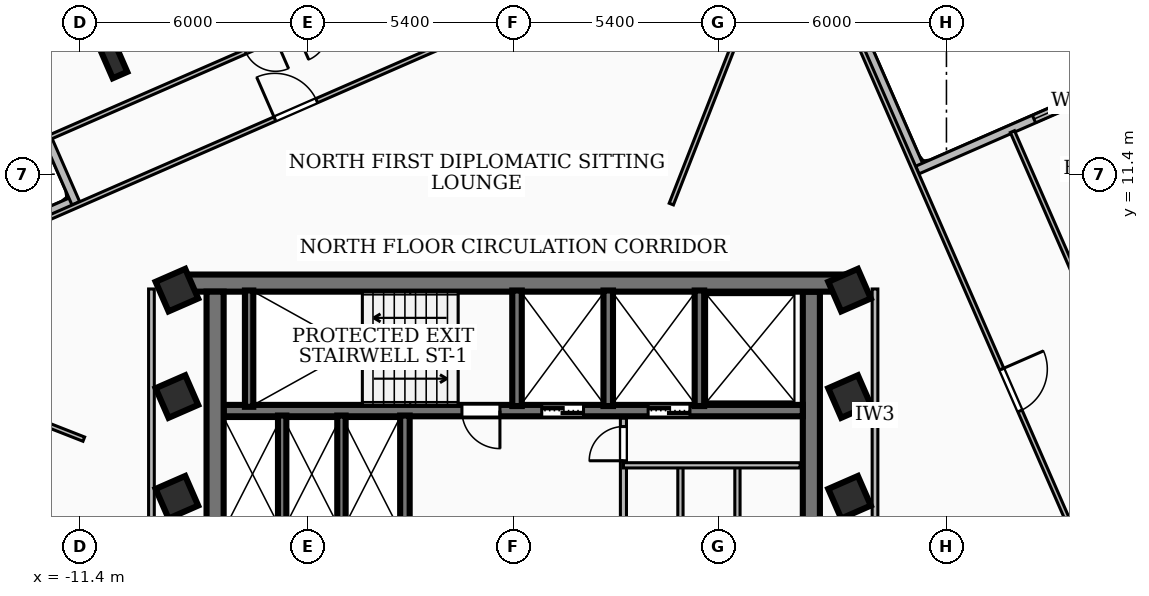
"""IFC4 building model, lengths in metres.
Left out: names, types, materials, properties, quantities, classifications, styles, units other than length and angle.
Written with IfcOpenShell. Run it as: python <this file> out.ifc"""

import sys

from ifc_helpers import new_model, si_unit, direction, frame, frame_2d, origin, origin_2d, place, context, subcontext, project, spatial, rectangle, i_section, extrude, element, fill, save


model = new_model("IFC4")
c1 = context("Model", 3, precision=1e-05, world=origin(), true_north=direction((0.0, 1.0)))
c2 = subcontext(c1, "Body", "Model", "MODEL_VIEW")
j1 = project(units=[si_unit("LENGTHUNIT", "METRE"), si_unit("PLANEANGLEUNIT", "RADIAN")], contexts=[c1])
p1 = place(None, origin())
s1 = spatial("IfcSite", under=j1, at=p1, CompositionType="ELEMENT")
p2 = place(p1, origin())
s2 = spatial("IfcBuilding", under=s1, at=p2, CompositionType="ELEMENT")
p3 = place(p2, frame((0.0, 0.0, 181.08)))
s3 = spatial("IfcBuildingStorey", under=s2, at=p3, CompositionType="ELEMENT", Elevation=181.08)
p4 = place(p3, frame((-8.78, 8.535, 0.0), z_axis=(0.0, 0.0, 1.0), x_axis=(1.0, 0.0, 0.0)))
e1 = element("IfcWall", 1, at=p4, inside=s3, PredefinedType="SHEAR", context=c2, shape_type="SweptSolid", body=[
    extrude(rectangle(XDim=17.56, YDim=0.45, at=frame_2d((8.78, 0.0))), origin(), (0.0, 0.0, 1.0), 3.34),
])
for number, where, z_axis, x_axis in (
    (2, (-7.845, 1.975, 0.0), (0.0, 0.0, 1.0), (0.0, 1.0, 0.0)),
    (3, (7.845, 8.31, 0.0), (0.0, 0.0, 1.0), (0.0, -1.0, 0.0)),
):
    element("IfcWall", number, at=place(p3, frame(where, z_axis=z_axis, x_axis=x_axis)), inside=s3, PredefinedType="SHEAR", context=c2, shape_type="SweptSolid", body=[
        extrude(rectangle(XDim=6.335, YDim=0.45, at=frame_2d((3.167, 0.0))), origin(), (0.0, 0.0, 1.0), 3.34),
    ])
p5 = place(p3, frame((7.62, 5.18, 0.0), z_axis=(0.0, 0.0, 1.0), x_axis=(-1.0, 0.0, 0.0)))
e4 = element("IfcWall", 4, at=p5, inside=s3, PredefinedType="SOLIDWALL", context=c2, shape_type="SweptSolid", body=[
    extrude(rectangle(XDim=15.24, YDim=0.3, at=frame_2d((7.62, 0.0))), origin(), (0.0, 0.0, 1.0), 3.34),
])
p6 = place(p5, frame((5.77, 0.0, 0.0)))
e5 = element("IfcOpeningElement", 5, at=p6, cuts=e4, PredefinedType="OPENING", context=c2, shape_type="SweptSolid", body=[
    extrude(rectangle(XDim=1.1, YDim=2.15, at=frame_2d((0.55, 1.075))), frame((0.0, 0.16, 0.0), z_axis=(0.0, -1.0, 0.0), x_axis=(1.0, 0.0, 0.0)), (0.0, 0.0, 1.0), 0.32),
])
p7 = place(p5, frame((2.97, 0.0, 0.0)))
e6 = element("IfcOpeningElement", 6, at=p7, cuts=e4, PredefinedType="OPENING", context=c2, shape_type="SweptSolid", body=[
    extrude(rectangle(XDim=1.1, YDim=2.15, at=frame_2d((0.55, 1.075))), frame((0.0, 0.16, 0.0), z_axis=(0.0, -1.0, 0.0), x_axis=(1.0, 0.0, 0.0)), (0.0, 0.0, 1.0), 0.32),
])
p8 = place(p5, frame((7.97, 0.0, 0.0)))
e7 = element("IfcOpeningElement", 7, at=p8, cuts=e4, PredefinedType="OPENING", context=c2, shape_type="SweptSolid", body=[
    extrude(rectangle(XDim=1.0, YDim=2.1, at=frame_2d((0.5, 1.05))), frame((0.0, 0.16, 0.0), z_axis=(0.0, -1.0, 0.0), x_axis=(1.0, 0.0, 0.0)), (0.0, 0.0, 1.0), 0.32),
])
p9 = place(p3, frame((-6.95, 5.28, 0.0), z_axis=(0.0, 0.0, 1.0), x_axis=(0.0, 1.0, 0.0)))
e8 = element("IfcWall", 8, at=p9, inside=s3, PredefinedType="SOLIDWALL", context=c2, shape_type="SweptSolid", body=[
    extrude(rectangle(XDim=3.06, YDim=0.22, at=frame_2d((1.53, 0.0))), origin(), (0.0, 0.0, 1.0), 3.34),
])
for number, where, z_axis, x_axis in (
    (9, (0.1, 5.3, 0.0), (0.0, 0.0, 1.0), (0.0, 1.0, 0.0)),
    (10, (2.5, 5.3, 0.0), (0.0, 0.0, 1.0), (0.0, 1.0, 0.0)),
    (11, (4.9, 5.3, 0.0), (0.0, 0.0, 1.0), (0.0, 1.0, 0.0)),
):
    element("IfcWall", number, at=place(p3, frame(where, z_axis=z_axis, x_axis=x_axis)), inside=s3, PredefinedType="SOLIDWALL", context=c2, shape_type="SweptSolid", body=[
        extrude(rectangle(XDim=3.04, YDim=0.25, at=frame_2d((1.52, 0.0))), origin(), (0.0, 0.0, 1.0), 3.34),
    ])
p10 = place(p3, frame((-2.85, 1.98, 0.0), z_axis=(0.0, 0.0, 1.0), x_axis=(0.0, 1.0, 0.0)))
e12 = element("IfcWall", 12, at=p10, inside=s3, PredefinedType="SOLIDWALL", context=c2, shape_type="SweptSolid", body=[
    extrude(rectangle(XDim=3.07, YDim=0.25, at=frame_2d((1.535, 0.0))), origin(), (0.0, 0.0, 1.0), 3.34),
])
for number, where, z_axis, x_axis in (
    (13, (-6.08, 1.98, 0.0), (0.0, 0.0, 1.0), (0.0, 1.0, 0.0)),
    (14, (-4.52, 1.98, 0.0), (0.0, 0.0, 1.0), (0.0, 1.0, 0.0)),
):
    element("IfcWall", number, at=place(p3, frame(where, z_axis=z_axis, x_axis=x_axis)), inside=s3, PredefinedType="SOLIDWALL", context=c2, shape_type="SweptSolid", body=[
        extrude(rectangle(XDim=3.07, YDim=0.22, at=frame_2d((1.535, 0.0))), origin(), (0.0, 0.0, 1.0), 3.34),
    ])
for number, where, z_axis, x_axis in (
    (15, (-8.85, 2.9, 0.0), (0.0, 0.0, 1.0), (0.916, 0.4, 0.0)),
    (16, (-8.85, 5.55, 0.0), (0.0, 0.0, 1.0), (0.916, 0.4, 0.0)),
    (17, (8.85, 2.9, 0.0), (0.0, 0.0, 1.0), (0.916, 0.4, 0.0)),
    (18, (8.85, 5.55, 0.0), (0.0, 0.0, 1.0), (0.916, 0.4, 0.0)),
    (19, (-8.85, 8.35, 0.0), (0.0, 0.0, 1.0), (0.916, 0.4, 0.0)),
    (20, (8.85, 8.35, 0.0), (0.0, 0.0, 1.0), (0.916, 0.4, 0.0)),
):
    element("IfcColumn", number, at=place(p3, frame(where, z_axis=z_axis, x_axis=x_axis)), inside=s3, PredefinedType="COLUMN", context=c2, shape_type="SweptSolid", body=[
        extrude(rectangle(XDim=0.85, YDim=0.85, at=origin_2d()), origin(), (0.0, 0.0, 1.0), 3.6),
    ])
p11 = place(p3, frame((-10.533, 14.433, 0.0), z_axis=(0.0, 0.0, 1.0), x_axis=(0.916362729562, 0.400349032557, 0.0)))
e21 = element("IfcColumn", 21, at=p11, inside=s3, PredefinedType="COLUMN", context=c2, shape_type="SweptSolid", body=[
    extrude(i_section(OverallWidth=0.418, OverallDepth=0.927, WebThickness=0.019, FlangeThickness=0.032, at=origin_2d()), origin(), (0.0, 0.0, 1.0), 3.6),
])
p12 = place(p3, frame((-17.658, 8.044, 0.0), z_axis=(0.0, 0.0, 1.0), x_axis=(0.916361145567, 0.400352658158, 0.0)))
e22 = element("IfcWall", 22, at=p12, inside=s3, PredefinedType="SOLIDWALL", context=c2, shape_type="SweptSolid", body=[
    extrude(rectangle(XDim=6.759, YDim=0.22, at=frame_2d((3.38, 0.0))), origin(), (0.0, 0.0, 1.0), 3.34),
])
p13 = place(p3, frame((-11.51, 10.634, 0.0), z_axis=(0.0, 0.0, 1.0), x_axis=(-0.400350381948, 0.916362140027, 0.0)))
e23 = element("IfcWall", 23, at=p13, inside=s3, PredefinedType="SOLIDWALL", context=c2, shape_type="SweptSolid", body=[
    extrude(rectangle(XDim=8.258, YDim=0.22, at=frame_2d((4.129, 0.0))), origin(), (0.0, 0.0, 1.0), 3.34),
])
p14 = place(p13, frame((5.358, 0.0, 0.85)))
e24 = element("IfcOpeningElement", 24, at=p14, cuts=e23, PredefinedType="OPENING", context=c2, shape_type="SweptSolid", body=[
    extrude(rectangle(XDim=1.8, YDim=1.6, at=frame_2d((0.9, 0.8))), frame((0.0, 0.12, 0.0), z_axis=(0.0, -1.0, 0.0), x_axis=(1.0, 0.0, 0.0)), (0.0, 0.0, 1.0), 0.24),
])
p15 = place(p3, frame((8.044, 17.658, 0.0), z_axis=(0.0, 0.0, 1.0), x_axis=(0.400352658158, -0.916361145567, 0.0)))
e25 = element("IfcWall", 25, at=p15, inside=s3, PredefinedType="SOLIDWALL", context=c2, shape_type="SweptSolid", body=[
    extrude(rectangle(XDim=6.759, YDim=0.22, at=frame_2d((3.38, 0.0))), origin(), (0.0, 0.0, 1.0), 3.34),
])
p16 = place(p3, frame((10.634, 11.51, 0.0), z_axis=(0.0, 0.0, 1.0), x_axis=(0.916355581171, 0.400365394179, 0.0)))
e26 = element("IfcWall", 26, at=p16, inside=s3, PredefinedType="SOLIDWALL", context=c2, shape_type="SweptSolid", body=[
    extrude(rectangle(XDim=9.859, YDim=0.22, at=frame_2d((4.929, 0.0))), origin(), (0.0, 0.0, 1.0), 3.34),
])
p17 = place(p16, frame((3.35, 0.0, 0.85)))
e27 = element("IfcOpeningElement", 27, at=p17, cuts=e26, PredefinedType="OPENING", context=c2, shape_type="SweptSolid", body=[
    extrude(rectangle(XDim=2.4, YDim=2.1, at=frame_2d((1.2, 1.05))), frame((0.0, 0.12, 0.0), z_axis=(0.0, -1.0, 0.0), x_axis=(1.0, 0.0, 0.0)), (0.0, 0.0, 1.0), 0.24),
])
p18 = place(p3, frame((2.9, 2.04, 0.0), z_axis=(0.0, 0.0, 1.0), x_axis=(0.0, 1.0, 0.0)))
e28 = element("IfcWall", 28, at=p18, inside=s3, PredefinedType="PARTITIONING", context=c2, shape_type="SweptSolid", body=[
    extrude(rectangle(XDim=2.94, YDim=0.16, at=frame_2d((1.47, 0.0))), origin(), (0.0, 0.0, 1.0), 2.57),
])
p19 = place(p18, frame((1.82, 0.0, 0.0)))
e29 = element("IfcOpeningElement", 29, at=p19, cuts=e28, PredefinedType="OPENING", context=c2, shape_type="SweptSolid", body=[
    extrude(rectangle(XDim=0.9, YDim=2.06, at=frame_2d((0.45, 1.03))), frame((0.0, 0.09, 0.0), z_axis=(0.0, -1.0, 0.0), x_axis=(1.0, 0.0, 0.0)), (0.0, 0.0, 1.0), 0.18),
])
p20 = place(p3, frame((2.9, 3.74, 0.0), z_axis=(0.0, 0.0, 1.0), x_axis=(1.0, 0.0, 0.0)))
e30 = element("IfcWall", 30, at=p20, inside=s3, PredefinedType="PARTITIONING", context=c2, shape_type="SweptSolid", body=[
    extrude(rectangle(XDim=4.65, YDim=0.138, at=frame_2d((2.325, 0.0))), origin(), (0.0, 0.0, 1.0), 3.34),
])
for number, where, z_axis, x_axis in (
    (31, (4.4, 1.85, 0.0), (0.0, 0.0, 1.0), (0.0, 1.0, 0.0)),
    (32, (5.9, 1.85, 0.0), (0.0, 0.0, 1.0), (0.0, 1.0, 0.0)),
):
    element("IfcWall", number, at=place(p3, frame(where, z_axis=z_axis, x_axis=x_axis)), inside=s3, PredefinedType="PARTITIONING", context=c2, shape_type="SweptSolid", body=[
        extrude(rectangle(XDim=1.89, YDim=0.138, at=frame_2d((0.945, 0.0))), origin(), (0.0, 0.0, 1.0), 2.57),
    ])
p21 = place(p3, frame((-9.52, 1.75, 0.0), z_axis=(0.0, 0.0, 1.0), x_axis=(0.0, 1.0, 0.0)))
e33 = element("IfcWall", 33, at=p21, inside=s3, PredefinedType="PARTITIONING", context=c2, shape_type="SweptSolid", body=[
    extrude(rectangle(XDim=6.63, YDim=0.15, at=frame_2d((3.315, 0.0))), origin(), (0.0, 0.0, 1.0), 3.34),
])
p22 = place(p3, frame((9.52, 1.75, 0.0), z_axis=(0.0, 0.0, 1.0), x_axis=(0.0, 1.0, 0.0)))
e34 = element("IfcWall", 34, at=p22, inside=s3, PredefinedType="PARTITIONING", context=c2, shape_type="SweptSolid", body=[
    extrude(rectangle(XDim=6.63, YDim=0.15, at=frame_2d((3.315, 0.0))), origin(), (0.0, 0.0, 1.0), 2.644),
])
p23 = place(p3, frame((4.16, 10.614, 0.0), z_axis=(0.0, 0.0, 1.0), x_axis=(0.364859873544, 0.931062442953, 0.0)))
e35 = element("IfcWall", 35, at=p23, inside=s3, PredefinedType="PARTITIONING", context=c2, shape_type="SweptSolid", body=[
    extrude(rectangle(XDim=8.274, YDim=0.12, at=frame_2d((4.137, 0.0))), origin(), (0.0, 0.0, 1.0), 3.34),
])
p24 = place(p3, frame((-11.3, 4.429, 0.0), z_axis=(0.0, 0.0, 1.0), x_axis=(-0.931071596241, 0.364836514995, 0.0)))
e36 = element("IfcWall", 36, at=p24, inside=s3, PredefinedType="PARTITIONING", context=c2, shape_type="SweptSolid", body=[
    extrude(rectangle(XDim=7.538, YDim=0.12, at=frame_2d((3.769, 0.0))), origin(), (0.0, 0.0, 1.0), 3.34),
])
p25 = place(p3, frame((8.915, 15.288, 0.0), z_axis=(0.0, 0.0, 1.0), x_axis=(0.400335531383, -0.916368627962, 0.0)))
e37 = element("IfcWall", 37, at=p25, inside=s3, PredefinedType="PARTITIONING", context=c2, shape_type="SweptSolid", body=[
    extrude(rectangle(XDim=20.46, YDim=0.12, at=frame_2d((10.23, 0.0))), origin(), (0.0, 0.0, 1.0), 2.644),
])
p26 = place(p25, frame((9.84, 0.0, 0.0)))
e38 = element("IfcOpeningElement", 38, at=p26, cuts=e37, PredefinedType="OPENING", context=c2, shape_type="SweptSolid", body=[
    extrude(rectangle(XDim=1.2, YDim=2.1, at=frame_2d((0.6, 1.05))), frame((0.0, 0.07, 0.0), z_axis=(0.0, -1.0, 0.0), x_axis=(1.0, 0.0, 0.0)), (0.0, 0.0, 1.0), 0.14),
])
p27 = place(p3, frame((13.136, 12.521, 0.0), z_axis=(0.0, 0.0, 1.0), x_axis=(0.400394200209, -0.916342994974, 0.0)))
e39 = element("IfcWall", 39, at=p27, inside=s3, PredefinedType="PARTITIONING", context=c2, shape_type="SweptSolid", body=[
    extrude(rectangle(XDim=12.85, YDim=0.12, at=frame_2d((6.425, 0.0))), origin(), (0.0, 0.0, 1.0), 2.644),
])
p28 = place(p27, frame((5.69, 0.0, 0.0)))
e40 = element("IfcOpeningElement", 40, at=p28, cuts=e39, PredefinedType="OPENING", context=c2, shape_type="SweptSolid", body=[
    extrude(rectangle(XDim=1.05, YDim=2.08, at=frame_2d((0.525, 1.04))), frame((0.0, 0.07, 0.0), z_axis=(0.0, -1.0, 0.0), x_axis=(1.0, 0.0, 0.0)), (0.0, 0.0, 1.0), 0.14),
])
p29 = place(p3, frame((-15.288, 8.915, 0.0), z_axis=(0.0, 0.0, 1.0), x_axis=(0.916368627962, 0.400335531383, 0.0)))
e41 = element("IfcWall", 41, at=p29, inside=s3, PredefinedType="PARTITIONING", context=c2, shape_type="SweptSolid", body=[
    extrude(rectangle(XDim=20.46, YDim=0.12, at=frame_2d((10.23, 0.0))), origin(), (0.0, 0.0, 1.0), 2.644),
])
p30 = place(p29, frame((9.84, 0.0, 0.0)))
e42 = element("IfcOpeningElement", 42, at=p30, cuts=e41, PredefinedType="OPENING", context=c2, shape_type="SweptSolid", body=[
    extrude(rectangle(XDim=1.2, YDim=2.1, at=frame_2d((0.6, 1.05))), frame((0.0, 0.07, 0.0), z_axis=(0.0, -1.0, 0.0), x_axis=(1.0, 0.0, 0.0)), (0.0, 0.0, 1.0), 0.14),
])
p31 = place(p3, frame((-0.414, 17.52, 0.0), z_axis=(0.0, 0.0, 1.0), x_axis=(-0.916370877059, -0.400330383156, 0.0)))
e43 = element("IfcWall", 43, at=p31, inside=s3, PredefinedType="PARTITIONING", context=c2, shape_type="SweptSolid", body=[
    extrude(rectangle(XDim=12.85, YDim=0.12, at=frame_2d((6.425, 0.0))), origin(), (0.0, 0.0, 1.0), 2.644),
])
p32 = place(p31, frame((4.935, 0.0, 0.0)))
e44 = element("IfcOpeningElement", 44, at=p32, cuts=e43, PredefinedType="OPENING", context=c2, shape_type="SweptSolid", body=[
    extrude(rectangle(XDim=0.86, YDim=2.04, at=frame_2d((0.43, 1.02))), frame((0.0, 0.07, 0.0), z_axis=(0.0, -1.0, 0.0), x_axis=(1.0, 0.0, 0.0)), (0.0, 0.0, 1.0), 0.14),
])
p33 = place(p31, frame((6.375, 0.0, 0.0)))
e45 = element("IfcOpeningElement", 45, at=p33, cuts=e43, PredefinedType="OPENING", context=c2, shape_type="SweptSolid", body=[
    extrude(rectangle(XDim=0.86, YDim=2.04, at=frame_2d((0.43, 1.02))), frame((0.0, 0.07, 0.0), z_axis=(0.0, -1.0, 0.0), x_axis=(1.0, 0.0, 0.0)), (0.0, 0.0, 1.0), 0.14),
])
p34 = place(p3, frame((-8.915, -15.288, 0.0), z_axis=(0.0, 0.0, 1.0), x_axis=(-0.400335531383, 0.916368627962, 0.0)))
e46 = element("IfcWall", 46, at=p34, inside=s3, PredefinedType="PARTITIONING", context=c2, shape_type="SweptSolid", body=[
    extrude(rectangle(XDim=20.46, YDim=0.12, at=frame_2d((10.23, 0.0))), origin(), (0.0, 0.0, 1.0), 2.644),
])
p35 = place(p34, frame((9.84, 0.0, 0.0)))
e47 = element("IfcOpeningElement", 47, at=p35, cuts=e46, PredefinedType="OPENING", context=c2, shape_type="SweptSolid", body=[
    extrude(rectangle(XDim=1.2, YDim=2.1, at=frame_2d((0.6, 1.05))), frame((0.0, 0.07, 0.0), z_axis=(0.0, -1.0, 0.0), x_axis=(1.0, 0.0, 0.0)), (0.0, 0.0, 1.0), 0.14),
])
p36 = place(p17, origin())
e48 = element("IfcWindow", 48, at=p36, inside=s3, PartitioningType="SINGLE_PANEL", PredefinedType="WINDOW", context=c2, shape_type="SweptSolid", body=[
    extrude(rectangle(XDim=2.4, YDim=2.1, at=frame_2d((1.2, 1.05))), frame((0.0, 0.03, 0.0), z_axis=(0.0, -1.0, 0.0), x_axis=(1.0, 0.0, 0.0)), (0.0, 0.0, 1.0), 0.06),
])
fill(e27, e48)
p37 = place(p6, origin())
e49 = element("IfcDoor", 49, at=p37, inside=s3, OperationType="DOUBLE_DOOR_SLIDING", PredefinedType="DOOR", context=c2, shape_type="SweptSolid", body=[
    extrude(rectangle(XDim=1.1, YDim=2.15, at=frame_2d((0.55, 1.075))), frame((0.0, 0.025, 0.0), z_axis=(0.0, -1.0, 0.0), x_axis=(1.0, 0.0, 0.0)), (0.0, 0.0, 1.0), 0.05),
])
fill(e5, e49)
p38 = place(p7, origin())
e50 = element("IfcDoor", 50, at=p38, inside=s3, OperationType="DOUBLE_DOOR_SLIDING", PredefinedType="DOOR", context=c2, shape_type="SweptSolid", body=[
    extrude(rectangle(XDim=1.1, YDim=2.15, at=frame_2d((0.55, 1.075))), frame((0.0, 0.025, 0.0), z_axis=(0.0, -1.0, 0.0), x_axis=(1.0, 0.0, 0.0)), (0.0, 0.0, 1.0), 0.05),
])
fill(e6, e50)
p39 = place(p8, origin())
e51 = element("IfcDoor", 51, at=p39, inside=s3, OperationType="SINGLE_SWING_LEFT", PredefinedType="DOOR", context=c2, shape_type="SweptSolid", body=[
    extrude(rectangle(XDim=1.0, YDim=2.1, at=frame_2d((0.5, 1.05))), frame((0.0, 0.025, 0.0), z_axis=(0.0, -1.0, 0.0), x_axis=(1.0, 0.0, 0.0)), (0.0, 0.0, 1.0), 0.05),
])
fill(e7, e51)
p40 = place(p19, origin())
e52 = element("IfcDoor", 52, at=p40, inside=s3, OperationType="SINGLE_SWING_LEFT", PredefinedType="DOOR", context=c2, shape_type="SweptSolid", body=[
    extrude(rectangle(XDim=0.9, YDim=2.06, at=frame_2d((0.45, 1.03))), frame((0.0, 0.025, 0.0), z_axis=(0.0, -1.0, 0.0), x_axis=(1.0, 0.0, 0.0)), (0.0, 0.0, 1.0), 0.05),
])
fill(e29, e52)
p41 = place(p26, origin())
e53 = element("IfcDoor", 53, at=p41, inside=s3, OperationType="SINGLE_SWING_LEFT", PredefinedType="DOOR", context=c2, shape_type="SweptSolid", body=[
    extrude(rectangle(XDim=1.2, YDim=2.1, at=frame_2d((0.6, 1.05))), frame((0.0, 0.025, 0.0), z_axis=(0.0, -1.0, 0.0), x_axis=(1.0, 0.0, 0.0)), (0.0, 0.0, 1.0), 0.05),
])
fill(e38, e53)
p42 = place(p30, origin())
e54 = element("IfcDoor", 54, at=p42, inside=s3, OperationType="SINGLE_SWING_LEFT", PredefinedType="DOOR", context=c2, shape_type="SweptSolid", body=[
    extrude(rectangle(XDim=1.2, YDim=2.1, at=frame_2d((0.6, 1.05))), frame((0.0, 0.025, 0.0), z_axis=(0.0, -1.0, 0.0), x_axis=(1.0, 0.0, 0.0)), (0.0, 0.0, 1.0), 0.05),
])
fill(e42, e54)
p43 = place(p33, origin())
e55 = element("IfcDoor", 55, at=p43, inside=s3, OperationType="SINGLE_SWING_LEFT", PredefinedType="DOOR", context=c2, shape_type="SweptSolid", body=[
    extrude(rectangle(XDim=0.86, YDim=2.04, at=frame_2d((0.43, 1.02))), frame((0.0, 0.025, 0.0), z_axis=(0.0, -1.0, 0.0), x_axis=(1.0, 0.0, 0.0)), (0.0, 0.0, 1.0), 0.05),
])
fill(e45, e55)
save(model, sys.argv[1])
